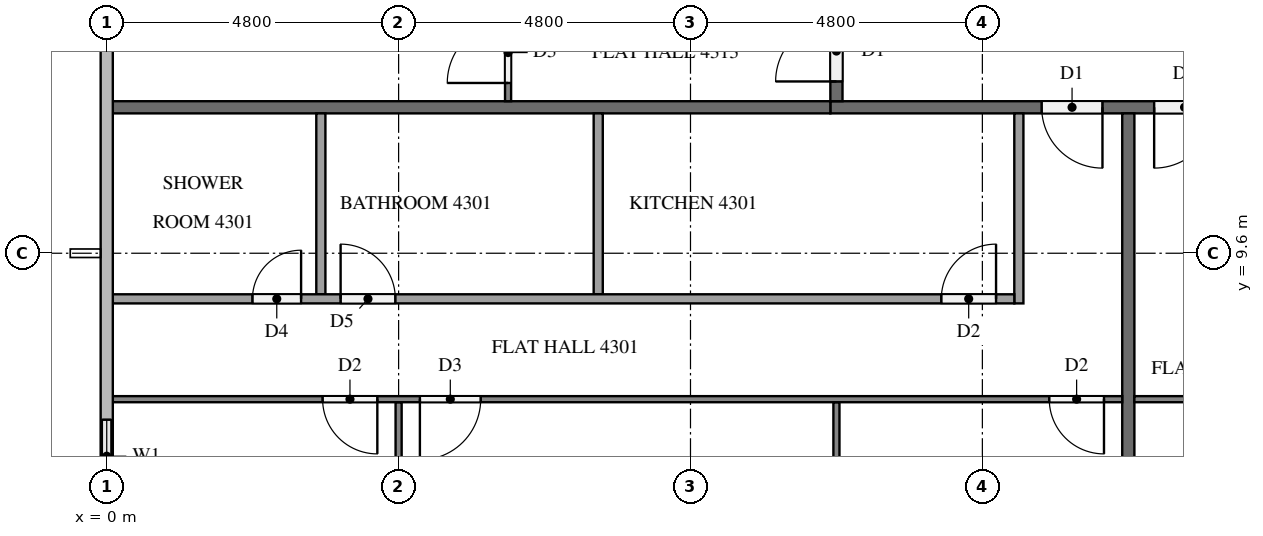
"""IFC4 building model, lengths in metres.
Left out: names, types, materials, properties, quantities, classifications, styles, units other than length and angle.
Written with IfcOpenShell. Run it as: python <this file> out.ifc"""

import sys

from ifc_helpers import new_model, si_unit, direction, frame, frame_2d, origin, place, context, subcontext, project, spatial, rectangle, extrude, element, fill, save


model = new_model("IFC4")
c1 = context("Model", 3, precision=1e-05, world=origin(), true_north=direction((0.0, 1.0)))
c2 = subcontext(c1, "Body", "Model", "MODEL_VIEW")
j1 = project(units=[si_unit("LENGTHUNIT", "METRE"), si_unit("PLANEANGLEUNIT", "RADIAN")], contexts=[c1])
p1 = place(None, origin())
s1 = spatial("IfcSite", under=j1, at=p1, CompositionType="ELEMENT")
p2 = place(p1, origin())
s2 = spatial("IfcBuilding", under=s1, at=p2, CompositionType="ELEMENT")
p3 = place(p2, frame((0.0, 0.0, 166.5)))
s3 = spatial("IfcBuildingStorey", under=s2, at=p3, CompositionType="ELEMENT", Elevation=166.5)
p4 = place(p3, frame((0.0, 7.2, 0.0), z_axis=(0.0, 0.0, 1.0), x_axis=(0.0, -1.0, 0.0)))
e1 = element("IfcWall", 1, at=p4, inside=s3, PredefinedType="SOLIDWALL", context=c2, shape_type="SweptSolid", body=[
    extrude(rectangle(XDim=1.875, YDim=0.15, at=frame_2d((0.938, 0.0))), origin(), (0.0, 0.0, 1.0), 3.2),
])
p5 = place(p4, frame((0.337, 0.0, 0.9)))
e2 = element("IfcOpeningElement", 2, at=p5, cuts=e1, PredefinedType="OPENING", context=c2, shape_type="SweptSolid", body=[
    extrude(rectangle(XDim=1.2, YDim=1.4, at=frame_2d((0.6, 0.7))), frame((0.0, 0.085, 0.0), z_axis=(0.0, -1.0, 0.0), x_axis=(1.0, 0.0, 0.0)), (0.0, 0.0, 1.0), 0.17),
])
p6 = place(p3, frame((50.5, 12.0, 0.0), z_axis=(0.0, 0.0, 1.0), x_axis=(-1.0, 0.0, 0.0)))
e3 = element("IfcWall", 3, at=p6, inside=s3, PredefinedType="PARTITIONING", context=c2, shape_type="SweptSolid", body=[
    extrude(rectangle(XDim=38.6, YDim=0.2, at=frame_2d((19.3, 0.0))), origin(), (0.0, 0.0, 1.0), 3.2),
])
p7 = place(p6, frame((34.125, 0.0, 0.0)))
e4 = element("IfcOpeningElement", 4, at=p7, cuts=e3, PredefinedType="OPENING", context=c2, shape_type="SweptSolid", body=[
    extrude(rectangle(XDim=1.0, YDim=2.1, at=frame_2d((0.5, 1.05))), frame((0.0, 0.11, 0.0), z_axis=(0.0, -1.0, 0.0), x_axis=(1.0, 0.0, 0.0)), (0.0, 0.0, 1.0), 0.22),
])
p8 = place(p6, frame((32.275, 0.0, 0.0)))
e5 = element("IfcOpeningElement", 5, at=p8, cuts=e3, PredefinedType="OPENING", context=c2, shape_type="SweptSolid", body=[
    extrude(rectangle(XDim=1.0, YDim=2.1, at=frame_2d((0.5, 1.05))), frame((0.0, 0.11, 0.0), z_axis=(0.0, -1.0, 0.0), x_axis=(1.0, 0.0, 0.0)), (0.0, 0.0, 1.0), 0.22),
])
p9 = place(p6, frame((12.525, 0.0, 0.0)))
e6 = element("IfcOpeningElement", 6, at=p9, cuts=e3, PredefinedType="OPENING", context=c2, shape_type="SweptSolid", body=[
    extrude(rectangle(XDim=1.0, YDim=2.1, at=frame_2d((0.5, 1.05))), frame((0.0, 0.11, 0.0), z_axis=(0.0, -1.0, 0.0), x_axis=(1.0, 0.0, 0.0)), (0.0, 0.0, 1.0), 0.22),
])
p10 = place(p6, frame((10.625, 0.0, 0.0)))
e7 = element("IfcOpeningElement", 7, at=p10, cuts=e3, PredefinedType="OPENING", context=c2, shape_type="SweptSolid", body=[
    extrude(rectangle(XDim=1.1, YDim=2.1, at=frame_2d((0.55, 1.05))), frame((0.0, 0.11, 0.0), z_axis=(0.0, -1.0, 0.0), x_axis=(1.0, 0.0, 0.0)), (0.0, 0.0, 1.0), 0.22),
])
p11 = place(p3, frame((12.0, 12.1, 0.0), z_axis=(0.0, 0.0, 1.0), x_axis=(0.0, 1.0, 0.0)))
e8 = element("IfcWall", 8, at=p11, inside=s3, PredefinedType="PARTITIONING", context=c2, shape_type="SweptSolid", body=[
    extrude(rectangle(XDim=28.6, YDim=0.2, at=frame_2d((14.3, 0.0))), origin(), (0.0, 0.0, 1.0), 3.2),
])
p12 = place(p11, frame((24.325, 0.0, 0.0)))
e9 = element("IfcOpeningElement", 9, at=p12, cuts=e8, PredefinedType="OPENING", context=c2, shape_type="SweptSolid", body=[
    extrude(rectangle(XDim=1.0, YDim=2.1, at=frame_2d((0.5, 1.05))), frame((0.0, 0.11, 0.0), z_axis=(0.0, -1.0, 0.0), x_axis=(1.0, 0.0, 0.0)), (0.0, 0.0, 1.0), 0.22),
])
p13 = place(p11, frame((22.475, 0.0, 0.0)))
e10 = element("IfcOpeningElement", 10, at=p13, cuts=e8, PredefinedType="OPENING", context=c2, shape_type="SweptSolid", body=[
    extrude(rectangle(XDim=1.0, YDim=2.1, at=frame_2d((0.5, 1.05))), frame((0.0, 0.11, 0.0), z_axis=(0.0, -1.0, 0.0), x_axis=(1.0, 0.0, 0.0)), (0.0, 0.0, 1.0), 0.22),
])
p14 = place(p11, frame((0.325, 0.0, 0.0)))
e11 = element("IfcOpeningElement", 11, at=p14, cuts=e8, PredefinedType="OPENING", context=c2, shape_type="SweptSolid", body=[
    extrude(rectangle(XDim=1.0, YDim=2.1, at=frame_2d((0.5, 1.05))), frame((0.0, 0.11, 0.0), z_axis=(0.0, -1.0, 0.0), x_axis=(1.0, 0.0, 0.0)), (0.0, 0.0, 1.0), 0.22),
])
for number, where, z_axis, x_axis in (
    (12, (16.8, 11.9, 0.0), (0.0, 0.0, 1.0), (0.0, -1.0, 0.0)),
    (13, (0.1, 12.0, 0.0), (0.0, 0.0, 1.0), (1.0, 0.0, 0.0)),
):
    element("IfcWall", number, at=place(p3, frame(where, z_axis=z_axis, x_axis=x_axis)), inside=s3, PredefinedType="PARTITIONING", context=c2, shape_type="SweptSolid", body=[
        extrude(rectangle(XDim=11.8, YDim=0.2, at=frame_2d((5.9, 0.0))), origin(), (0.0, 0.0, 1.0), 3.2),
    ])
p15 = place(p3, frame((12.0, 7.15, 0.0), z_axis=(0.0, 0.0, 1.0), x_axis=(0.0, -1.0, 0.0)))
e14 = element("IfcWall", 14, at=p15, inside=s3, PredefinedType="PARTITIONING", context=c2, shape_type="SweptSolid", body=[
    extrude(rectangle(XDim=7.05, YDim=0.1, at=frame_2d((3.525, 0.0))), origin(), (0.0, 0.0, 1.0), 3.2),
])
p16 = place(p3, frame((4.8, 7.15, 0.0), z_axis=(0.0, 0.0, 1.0), x_axis=(0.0, -1.0, 0.0)))
e15 = element("IfcWall", 15, at=p16, inside=s3, PredefinedType="PARTITIONING", context=c2, shape_type="SweptSolid", body=[
    extrude(rectangle(XDim=6.625, YDim=0.1, at=frame_2d((3.312, 0.0))), origin(), (0.0, 0.0, 1.0), 3.2),
])
p17 = place(p3, frame((16.7, 7.2, 0.0), z_axis=(0.0, 0.0, 1.0), x_axis=(-1.0, 0.0, 0.0)))
e16 = element("IfcWall", 16, at=p17, inside=s3, PredefinedType="PARTITIONING", context=c2, shape_type="SweptSolid", body=[
    extrude(rectangle(XDim=16.6, YDim=0.1, at=frame_2d((8.3, 0.0))), origin(), (0.0, 0.0, 1.0), 3.2),
])
p18 = place(p17, frame((0.3, 0.0, 0.0)))
e17 = element("IfcOpeningElement", 17, at=p18, cuts=e16, PredefinedType="OPENING", context=c2, shape_type="SweptSolid", body=[
    extrude(rectangle(XDim=0.9, YDim=2.1, at=frame_2d((0.45, 1.05))), frame((0.0, 0.06, 0.0), z_axis=(0.0, -1.0, 0.0), x_axis=(1.0, 0.0, 0.0)), (0.0, 0.0, 1.0), 0.12),
])
p19 = place(p17, frame((10.55, 0.0, 0.0)))
e18 = element("IfcOpeningElement", 18, at=p19, cuts=e16, PredefinedType="OPENING", context=c2, shape_type="SweptSolid", body=[
    extrude(rectangle(XDim=1.0, YDim=2.1, at=frame_2d((0.5, 1.05))), frame((0.0, 0.06, 0.0), z_axis=(0.0, -1.0, 0.0), x_axis=(1.0, 0.0, 0.0)), (0.0, 0.0, 1.0), 0.12),
])
p20 = place(p17, frame((12.25, 0.0, 0.0)))
e19 = element("IfcOpeningElement", 19, at=p20, cuts=e16, PredefinedType="OPENING", context=c2, shape_type="SweptSolid", body=[
    extrude(rectangle(XDim=0.9, YDim=2.1, at=frame_2d((0.45, 1.05))), frame((0.0, 0.06, 0.0), z_axis=(0.0, -1.0, 0.0), x_axis=(1.0, 0.0, 0.0)), (0.0, 0.0, 1.0), 0.12),
])
for number, where, z_axis, x_axis in (
    (20, (8.083, 11.9, 0.0), (0.0, 0.0, 1.0), (0.0, -1.0, 0.0)),
    (21, (3.521, 11.9, 0.0), (0.0, 0.0, 1.0), (0.0, -1.0, 0.0)),
):
    element("IfcWall", number, at=place(p3, frame(where, z_axis=z_axis, x_axis=x_axis)), inside=s3, PredefinedType="PARTITIONING", context=c2, shape_type="SweptSolid", body=[
        extrude(rectangle(XDim=2.975, YDim=0.15, at=frame_2d((1.487, 0.0))), origin(), (0.0, 0.0, 1.0), 3.2),
    ])
p21 = place(p3, frame((15.0, 11.9, 0.0), z_axis=(0.0, 0.0, 1.0), x_axis=(0.0, -1.0, 0.0)))
e22 = element("IfcWall", 22, at=p21, inside=s3, PredefinedType="PARTITIONING", context=c2, shape_type="SweptSolid", body=[
    extrude(rectangle(XDim=3.125, YDim=0.15, at=frame_2d((1.562, 0.0))), origin(), (0.0, 0.0, 1.0), 3.2),
])
p22 = place(p3, frame((0.1, 8.85, 0.0), z_axis=(0.0, 0.0, 1.0), x_axis=(1.0, 0.0, 0.0)))
e23 = element("IfcWall", 23, at=p22, inside=s3, PredefinedType="PARTITIONING", context=c2, shape_type="SweptSolid", body=[
    extrude(rectangle(XDim=14.825, YDim=0.15, at=frame_2d((7.413, 0.0))), origin(), (0.0, 0.0, 1.0), 3.2),
])
p23 = place(p22, frame((13.625, 0.0, 0.0)))
e24 = element("IfcOpeningElement", 24, at=p23, cuts=e23, PredefinedType="OPENING", context=c2, shape_type="SweptSolid", body=[
    extrude(rectangle(XDim=0.9, YDim=2.1, at=frame_2d((0.45, 1.05))), frame((0.0, 0.085, 0.0), z_axis=(0.0, -1.0, 0.0), x_axis=(1.0, 0.0, 0.0)), (0.0, 0.0, 1.0), 0.17),
])
p24 = place(p22, frame((3.746, 0.0, 0.0)))
e25 = element("IfcOpeningElement", 25, at=p24, cuts=e23, PredefinedType="OPENING", context=c2, shape_type="SweptSolid", body=[
    extrude(rectangle(XDim=0.9, YDim=2.1, at=frame_2d((0.45, 1.05))), frame((0.0, 0.085, 0.0), z_axis=(0.0, -1.0, 0.0), x_axis=(1.0, 0.0, 0.0)), (0.0, 0.0, 1.0), 0.17),
])
p25 = place(p22, frame((2.296, 0.0, 0.0)))
e26 = element("IfcOpeningElement", 26, at=p25, cuts=e23, PredefinedType="OPENING", context=c2, shape_type="SweptSolid", body=[
    extrude(rectangle(XDim=0.8, YDim=2.1, at=frame_2d((0.4, 1.05))), frame((0.0, 0.085, 0.0), z_axis=(0.0, -1.0, 0.0), x_axis=(1.0, 0.0, 0.0)), (0.0, 0.0, 1.0), 0.17),
])
p26 = place(p3, frame((23.9, 7.2, 0.0), z_axis=(0.0, 0.0, 1.0), x_axis=(-1.0, 0.0, 0.0)))
e27 = element("IfcWall", 27, at=p26, inside=s3, PredefinedType="PARTITIONING", context=c2, shape_type="SweptSolid", body=[
    extrude(rectangle(XDim=7.0, YDim=0.1, at=frame_2d((3.5, 0.0))), origin(), (0.0, 0.0, 1.0), 3.2),
])
p27 = place(p26, frame((0.3, 0.0, 0.0)))
e28 = element("IfcOpeningElement", 28, at=p27, cuts=e27, PredefinedType="OPENING", context=c2, shape_type="SweptSolid", body=[
    extrude(rectangle(XDim=1.0, YDim=2.1, at=frame_2d((0.5, 1.05))), frame((0.0, 0.06, 0.0), z_axis=(0.0, -1.0, 0.0), x_axis=(1.0, 0.0, 0.0)), (0.0, 0.0, 1.0), 0.12),
])
p28 = place(p3, frame((6.6, 12.1, 0.0), z_axis=(0.0, 0.0, 1.0), x_axis=(0.0, 1.0, 0.0)))
e29 = element("IfcWall", 29, at=p28, inside=s3, PredefinedType="PARTITIONING", context=c2, shape_type="SweptSolid", body=[
    extrude(rectangle(XDim=14.2, YDim=0.1, at=frame_2d((7.1, 0.0))), origin(), (0.0, 0.0, 1.0), 3.2),
])
p29 = place(p28, frame((0.3, 0.0, 0.0)))
e30 = element("IfcOpeningElement", 30, at=p29, cuts=e29, PredefinedType="OPENING", context=c2, shape_type="SweptSolid", body=[
    extrude(rectangle(XDim=1.0, YDim=2.1, at=frame_2d((0.5, 1.05))), frame((0.0, 0.06, 0.0), z_axis=(0.0, -1.0, 0.0), x_axis=(1.0, 0.0, 0.0)), (0.0, 0.0, 1.0), 0.12),
])
p30 = place(p28, frame((8.25, 0.0, 0.0)))
e31 = element("IfcOpeningElement", 31, at=p30, cuts=e29, PredefinedType="OPENING", context=c2, shape_type="SweptSolid", body=[
    extrude(rectangle(XDim=0.9, YDim=2.1, at=frame_2d((0.45, 1.05))), frame((0.0, 0.06, 0.0), z_axis=(0.0, -1.0, 0.0), x_axis=(1.0, 0.0, 0.0)), (0.0, 0.0, 1.0), 0.12),
])
p31 = place(p28, frame((9.85, 0.0, 0.0)))
e32 = element("IfcOpeningElement", 32, at=p31, cuts=e29, PredefinedType="OPENING", context=c2, shape_type="SweptSolid", body=[
    extrude(rectangle(XDim=0.9, YDim=2.1, at=frame_2d((0.45, 1.05))), frame((0.0, 0.06, 0.0), z_axis=(0.0, -1.0, 0.0), x_axis=(1.0, 0.0, 0.0)), (0.0, 0.0, 1.0), 0.12),
])
p32 = place(p5, origin())
e33 = element("IfcWindow", 33, at=p32, inside=s3, PartitioningType="SINGLE_PANEL", PredefinedType="WINDOW", context=c2, shape_type="SweptSolid", body=[
    extrude(rectangle(XDim=1.2, YDim=1.4, at=frame_2d((0.6, 0.7))), frame((0.0, 0.03, 0.0), z_axis=(0.0, -1.0, 0.0), x_axis=(1.0, 0.0, 0.0)), (0.0, 0.0, 1.0), 0.06),
])
fill(e2, e33)
p33 = place(p7, origin())
e34 = element("IfcDoor", 34, at=p33, inside=s3, OperationType="SINGLE_SWING_LEFT", PredefinedType="DOOR", context=c2, shape_type="SweptSolid", body=[
    extrude(rectangle(XDim=1.0, YDim=2.1, at=frame_2d((0.5, 1.05))), frame((0.0, 0.025, 0.0), z_axis=(0.0, -1.0, 0.0), x_axis=(1.0, 0.0, 0.0)), (0.0, 0.0, 1.0), 0.05),
])
fill(e4, e34)
p34 = place(p8, origin())
e35 = element("IfcDoor", 35, at=p34, inside=s3, OperationType="SINGLE_SWING_RIGHT", PredefinedType="DOOR", context=c2, shape_type="SweptSolid", body=[
    extrude(rectangle(XDim=1.0, YDim=2.1, at=frame_2d((0.5, 1.05))), frame((0.0, 0.025, 0.0), z_axis=(0.0, -1.0, 0.0), x_axis=(1.0, 0.0, 0.0)), (0.0, 0.0, 1.0), 0.05),
])
fill(e5, e35)
p35 = place(p14, origin())
e36 = element("IfcDoor", 36, at=p35, inside=s3, OperationType="SINGLE_SWING_LEFT", PredefinedType="DOOR", context=c2, shape_type="SweptSolid", body=[
    extrude(rectangle(XDim=1.0, YDim=2.1, at=frame_2d((0.5, 1.05))), frame((0.0, 0.025, 0.0), z_axis=(0.0, -1.0, 0.0), x_axis=(1.0, 0.0, 0.0)), (0.0, 0.0, 1.0), 0.05),
])
fill(e11, e36)
p36 = place(p18, origin())
e37 = element("IfcDoor", 37, at=p36, inside=s3, OperationType="SINGLE_SWING_LEFT", PredefinedType="DOOR", context=c2, shape_type="SweptSolid", body=[
    extrude(rectangle(XDim=0.9, YDim=2.1, at=frame_2d((0.45, 1.05))), frame((0.0, 0.025, 0.0), z_axis=(0.0, -1.0, 0.0), x_axis=(1.0, 0.0, 0.0)), (0.0, 0.0, 1.0), 0.05),
])
fill(e17, e37)
p37 = place(p19, origin())
e38 = element("IfcDoor", 38, at=p37, inside=s3, OperationType="SINGLE_SWING_RIGHT", PredefinedType="DOOR", context=c2, shape_type="SweptSolid", body=[
    extrude(rectangle(XDim=1.0, YDim=2.1, at=frame_2d((0.5, 1.05))), frame((0.0, 0.025, 0.0), z_axis=(0.0, -1.0, 0.0), x_axis=(1.0, 0.0, 0.0)), (0.0, 0.0, 1.0), 0.05),
])
fill(e18, e38)
p38 = place(p20, origin())
e39 = element("IfcDoor", 39, at=p38, inside=s3, OperationType="SINGLE_SWING_LEFT", PredefinedType="DOOR", context=c2, shape_type="SweptSolid", body=[
    extrude(rectangle(XDim=0.9, YDim=2.1, at=frame_2d((0.45, 1.05))), frame((0.0, 0.025, 0.0), z_axis=(0.0, -1.0, 0.0), x_axis=(1.0, 0.0, 0.0)), (0.0, 0.0, 1.0), 0.05),
])
fill(e19, e39)
p39 = place(p23, origin())
e40 = element("IfcDoor", 40, at=p39, inside=s3, OperationType="SINGLE_SWING_RIGHT", PredefinedType="DOOR", context=c2, shape_type="SweptSolid", body=[
    extrude(rectangle(XDim=0.9, YDim=2.1, at=frame_2d((0.45, 1.05))), frame((0.0, 0.025, 0.0), z_axis=(0.0, -1.0, 0.0), x_axis=(1.0, 0.0, 0.0)), (0.0, 0.0, 1.0), 0.05),
])
fill(e24, e40)
p40 = place(p24, origin())
e41 = element("IfcDoor", 41, at=p40, inside=s3, OperationType="SINGLE_SWING_LEFT", PredefinedType="DOOR", context=c2, shape_type="SweptSolid", body=[
    extrude(rectangle(XDim=0.9, YDim=2.1, at=frame_2d((0.45, 1.05))), frame((0.0, 0.025, 0.0), z_axis=(0.0, -1.0, 0.0), x_axis=(1.0, 0.0, 0.0)), (0.0, 0.0, 1.0), 0.05),
])
fill(e25, e41)
p41 = place(p25, origin())
e42 = element("IfcDoor", 42, at=p41, inside=s3, OperationType="SINGLE_SWING_RIGHT", PredefinedType="DOOR", context=c2, shape_type="SweptSolid", body=[
    extrude(rectangle(XDim=0.8, YDim=2.1, at=frame_2d((0.4, 1.05))), frame((0.0, 0.025, 0.0), z_axis=(0.0, -1.0, 0.0), x_axis=(1.0, 0.0, 0.0)), (0.0, 0.0, 1.0), 0.05),
])
fill(e26, e42)
p42 = place(p29, origin())
e43 = element("IfcDoor", 43, at=p42, inside=s3, OperationType="SINGLE_SWING_LEFT", PredefinedType="DOOR", context=c2, shape_type="SweptSolid", body=[
    extrude(rectangle(XDim=1.0, YDim=2.1, at=frame_2d((0.5, 1.05))), frame((0.0, 0.025, 0.0), z_axis=(0.0, -1.0, 0.0), x_axis=(1.0, 0.0, 0.0)), (0.0, 0.0, 1.0), 0.05),
])
fill(e30, e43)
save(model, sys.argv[1])
